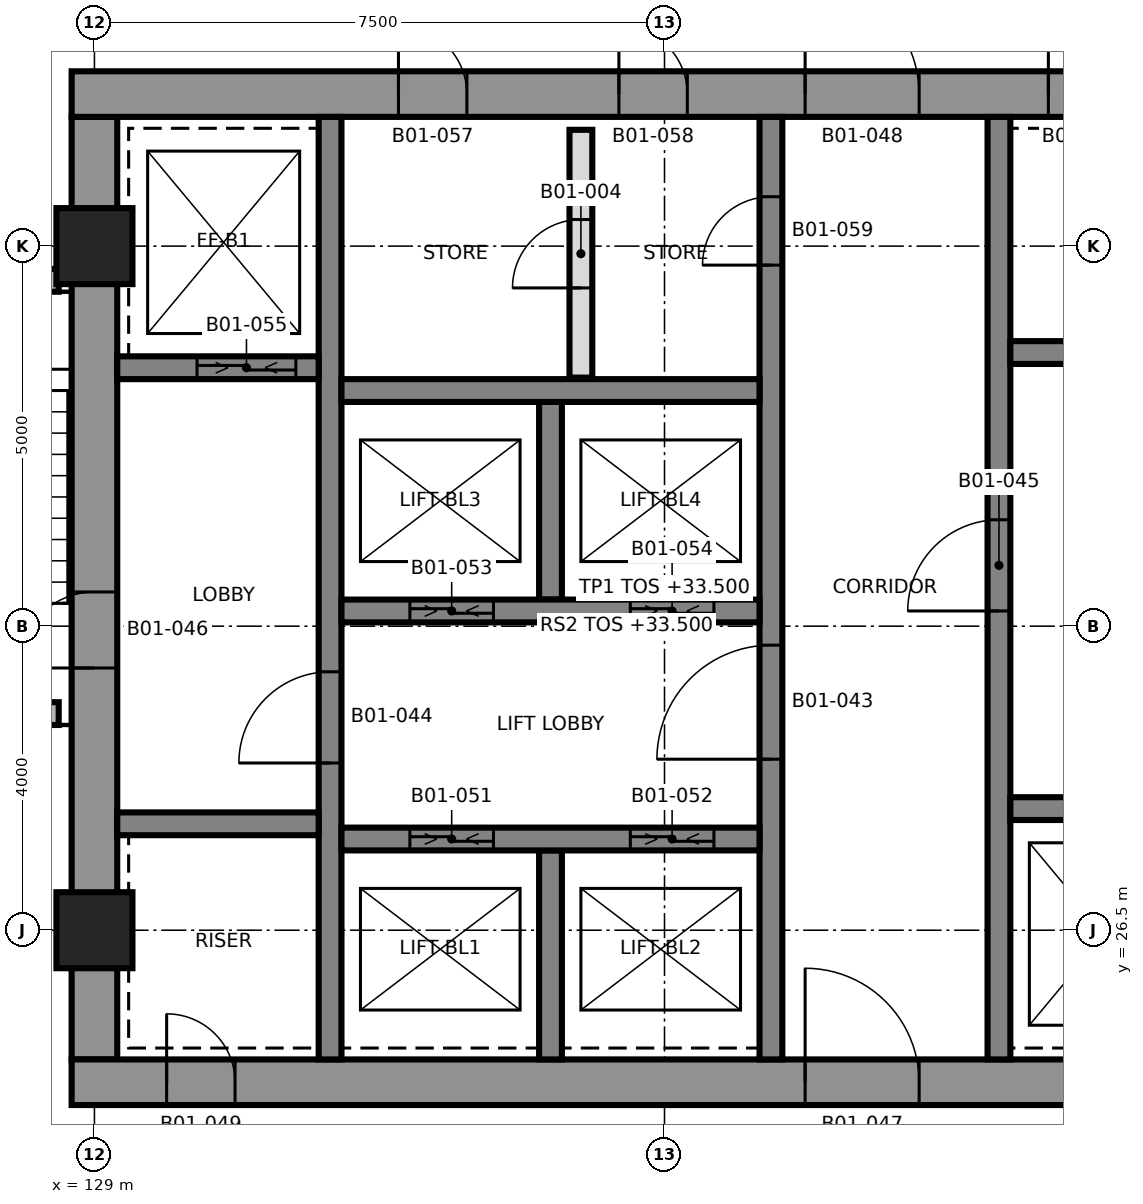
"""IFC4 building model, lengths in metres.
Left out: names, types, materials, properties, quantities, classifications, styles, units other than length and angle.
Written with IfcOpenShell. Run it as: python <this file> out.ifc"""

import sys

from ifc_helpers import new_model, si_unit, direction, frame, frame_2d, origin, origin_2d, place, context, subcontext, project, spatial, rectangle, extrude, element, fill, save


model = new_model("IFC4")
c1 = context("Model", 3, precision=1e-05, world=origin(), true_north=direction((0.0, 1.0)))
c2 = subcontext(c1, "Body", "Model", "MODEL_VIEW")
j1 = project(units=[si_unit("LENGTHUNIT", "METRE"), si_unit("PLANEANGLEUNIT", "RADIAN")], contexts=[c1])
p1 = place(None, origin())
s1 = spatial("IfcSite", under=j1, at=p1, CompositionType="ELEMENT")
p2 = place(p1, origin())
s2 = spatial("IfcBuilding", under=s1, at=p2, CompositionType="ELEMENT")
p3 = place(p2, frame((0.0, 0.0, 33.5)))
s3 = spatial("IfcBuildingStorey", under=s2, at=p3, CompositionType="ELEMENT", Elevation=33.5)
p4 = place(p3, frame((129.0, 24.8, 0.0), z_axis=(0.0, 0.0, 1.0), x_axis=(0.0, 1.0, 0.0)))
e1 = element("IfcWall", 1, at=p4, inside=s3, PredefinedType="SHEAR", context=c2, shape_type="SweptSolid", body=[
    extrude(rectangle(XDim=12.4, YDim=0.6, at=frame_2d((6.2, 0.0))), origin(), (0.0, 0.0, 1.0), 3.7),
])
p5 = place(p4, frame((5.15, 0.0, 0.0)))
e2 = element("IfcOpeningElement", 2, at=p5, cuts=e1, PredefinedType="OPENING", context=c2, shape_type="SweptSolid", body=[
    extrude(rectangle(XDim=1.0, YDim=2.1, at=frame_2d((0.5, 1.05))), frame((0.0, 0.31, 0.0), z_axis=(0.0, -1.0, 0.0), x_axis=(1.0, 0.0, 0.0)), (0.0, 0.0, 1.0), 0.62),
])
p6 = place(p3, frame((128.7, 24.5, 0.0), z_axis=(0.0, 0.0, 1.0), x_axis=(1.0, 0.0, 0.0)))
e3 = element("IfcWall", 3, at=p6, inside=s3, PredefinedType="SHEAR", context=c2, shape_type="SweptSolid", body=[
    extrude(rectangle(XDim=15.0, YDim=0.6, at=frame_2d((7.5, 0.0))), origin(), (0.0, 0.0, 1.0), 3.7),
])
p7 = place(p6, frame((9.65, 0.0, 0.0)))
e4 = element("IfcOpeningElement", 4, at=p7, cuts=e3, PredefinedType="OPENING", context=c2, shape_type="SweptSolid", body=[
    extrude(rectangle(XDim=1.5, YDim=2.1, at=frame_2d((0.75, 1.05))), frame((0.0, 0.31, 0.0), z_axis=(0.0, -1.0, 0.0), x_axis=(1.0, 0.0, 0.0)), (0.0, 0.0, 1.0), 0.62),
])
p8 = place(p6, frame((1.25, 0.0, 0.0)))
e5 = element("IfcOpeningElement", 5, at=p8, cuts=e3, PredefinedType="OPENING", context=c2, shape_type="SweptSolid", body=[
    extrude(rectangle(XDim=0.9, YDim=2.1, at=frame_2d((0.45, 1.05))), frame((0.0, 0.31, 0.0), z_axis=(0.0, -1.0, 0.0), x_axis=(1.0, 0.0, 0.0)), (0.0, 0.0, 1.0), 0.62),
])
p9 = place(p3, frame((128.7, 37.5, 0.0), z_axis=(0.0, 0.0, 1.0), x_axis=(1.0, 0.0, 0.0)))
e6 = element("IfcWall", 6, at=p9, inside=s3, PredefinedType="SHEAR", context=c2, shape_type="SweptSolid", body=[
    extrude(rectangle(XDim=15.0, YDim=0.6, at=frame_2d((7.5, 0.0))), origin(), (0.0, 0.0, 1.0), 3.7),
])
p10 = place(p9, frame((9.65, 0.0, 0.0)))
e7 = element("IfcOpeningElement", 7, at=p10, cuts=e6, PredefinedType="OPENING", context=c2, shape_type="SweptSolid", body=[
    extrude(rectangle(XDim=1.5, YDim=2.1, at=frame_2d((0.75, 1.05))), frame((0.0, 0.31, 0.0), z_axis=(0.0, -1.0, 0.0), x_axis=(1.0, 0.0, 0.0)), (0.0, 0.0, 1.0), 0.62),
])
p11 = place(p9, frame((12.85, 0.0, 0.0)))
e8 = element("IfcOpeningElement", 8, at=p11, cuts=e6, PredefinedType="OPENING", context=c2, shape_type="SweptSolid", body=[
    extrude(rectangle(XDim=0.9, YDim=2.1, at=frame_2d((0.45, 1.05))), frame((0.0, 0.31, 0.0), z_axis=(0.0, -1.0, 0.0), x_axis=(1.0, 0.0, 0.0)), (0.0, 0.0, 1.0), 0.62),
])
p12 = place(p9, frame((4.3, 0.0, 0.0)))
e9 = element("IfcOpeningElement", 9, at=p12, cuts=e6, PredefinedType="OPENING", context=c2, shape_type="SweptSolid", body=[
    extrude(rectangle(XDim=0.9, YDim=2.1, at=frame_2d((0.45, 1.05))), frame((0.0, 0.31, 0.0), z_axis=(0.0, -1.0, 0.0), x_axis=(1.0, 0.0, 0.0)), (0.0, 0.0, 1.0), 0.62),
])
p13 = place(p9, frame((7.2, 0.0, 0.0)))
e10 = element("IfcOpeningElement", 10, at=p13, cuts=e6, PredefinedType="OPENING", context=c2, shape_type="SweptSolid", body=[
    extrude(rectangle(XDim=0.9, YDim=2.1, at=frame_2d((0.45, 1.05))), frame((0.0, 0.31, 0.0), z_axis=(0.0, -1.0, 0.0), x_axis=(1.0, 0.0, 0.0)), (0.0, 0.0, 1.0), 0.62),
])
p14 = place(p3, frame((132.1, 24.8, 0.0), z_axis=(0.0, 0.0, 1.0), x_axis=(0.0, 1.0, 0.0)))
e11 = element("IfcWall", 11, at=p14, inside=s3, PredefinedType="SHEAR", context=c2, shape_type="SweptSolid", body=[
    extrude(rectangle(XDim=12.4, YDim=0.3, at=frame_2d((6.2, 0.0))), origin(), (0.0, 0.0, 1.0), 3.7),
])
p15 = place(p14, frame((3.9, 0.0, 0.0)))
e12 = element("IfcOpeningElement", 12, at=p15, cuts=e11, PredefinedType="OPENING", context=c2, shape_type="SweptSolid", body=[
    extrude(rectangle(XDim=1.2, YDim=2.1, at=frame_2d((0.6, 1.05))), frame((0.0, 0.16, 0.0), z_axis=(0.0, -1.0, 0.0), x_axis=(1.0, 0.0, 0.0)), (0.0, 0.0, 1.0), 0.32),
])
p16 = place(p3, frame((137.9, 24.8, 0.0), z_axis=(0.0, 0.0, 1.0), x_axis=(0.0, 1.0, 0.0)))
e13 = element("IfcWall", 13, at=p16, inside=s3, PredefinedType="SHEAR", context=c2, shape_type="SweptSolid", body=[
    extrude(rectangle(XDim=12.4, YDim=0.3, at=frame_2d((6.2, 0.0))), origin(), (0.0, 0.0, 1.0), 3.7),
])
p17 = place(p16, frame((3.95, 0.0, 0.0)))
e14 = element("IfcOpeningElement", 14, at=p17, cuts=e13, PredefinedType="OPENING", context=c2, shape_type="SweptSolid", body=[
    extrude(rectangle(XDim=1.5, YDim=2.1, at=frame_2d((0.75, 1.05))), frame((0.0, 0.16, 0.0), z_axis=(0.0, -1.0, 0.0), x_axis=(1.0, 0.0, 0.0)), (0.0, 0.0, 1.0), 0.32),
])
p18 = place(p16, frame((10.45, 0.0, 0.0)))
e15 = element("IfcOpeningElement", 15, at=p18, cuts=e13, PredefinedType="OPENING", context=c2, shape_type="SweptSolid", body=[
    extrude(rectangle(XDim=0.9, YDim=2.1, at=frame_2d((0.45, 1.05))), frame((0.0, 0.16, 0.0), z_axis=(0.0, -1.0, 0.0), x_axis=(1.0, 0.0, 0.0)), (0.0, 0.0, 1.0), 0.32),
])
p19 = place(p3, frame((140.9, 24.8, 0.0), z_axis=(0.0, 0.0, 1.0), x_axis=(0.0, 1.0, 0.0)))
e16 = element("IfcWall", 16, at=p19, inside=s3, PredefinedType="SHEAR", context=c2, shape_type="SweptSolid", body=[
    extrude(rectangle(XDim=12.4, YDim=0.3, at=frame_2d((6.2, 0.0))), origin(), (0.0, 0.0, 1.0), 3.7),
])
p20 = place(p19, frame((5.9, 0.0, 0.0)))
e17 = element("IfcOpeningElement", 17, at=p20, cuts=e16, PredefinedType="OPENING", context=c2, shape_type="SweptSolid", body=[
    extrude(rectangle(XDim=1.2, YDim=2.1, at=frame_2d((0.6, 1.05))), frame((0.0, 0.16, 0.0), z_axis=(0.0, -1.0, 0.0), x_axis=(1.0, 0.0, 0.0)), (0.0, 0.0, 1.0), 0.32),
])
p21 = place(p3, frame((135.0, 24.8, 0.0), z_axis=(0.0, 0.0, 1.0), x_axis=(0.0, 1.0, 0.0)))
e18 = element("IfcWall", 18, at=p21, inside=s3, PredefinedType="SHEAR", context=c2, shape_type="SweptSolid", body=[
    extrude(rectangle(XDim=2.75, YDim=0.3, at=frame_2d((1.375, 0.0))), origin(), (0.0, 0.0, 1.0), 3.7),
])
p22 = place(p3, frame((135.0, 30.85, 0.0), z_axis=(0.0, 0.0, 1.0), x_axis=(0.0, 1.0, 0.0)))
e19 = element("IfcWall", 19, at=p22, inside=s3, PredefinedType="SHEAR", context=c2, shape_type="SweptSolid", body=[
    extrude(rectangle(XDim=2.6, YDim=0.3, at=frame_2d((1.3, 0.0))), origin(), (0.0, 0.0, 1.0), 3.7),
])
p23 = place(p3, frame((132.25, 27.7, 0.0), z_axis=(0.0, 0.0, 1.0), x_axis=(1.0, 0.0, 0.0)))
e20 = element("IfcWall", 20, at=p23, inside=s3, PredefinedType="SHEAR", context=c2, shape_type="SweptSolid", body=[
    extrude(rectangle(XDim=5.5, YDim=0.3, at=frame_2d((2.75, 0.0))), origin(), (0.0, 0.0, 1.0), 3.7),
])
p24 = place(p23, frame((0.9, 0.0, 0.0)))
e21 = element("IfcOpeningElement", 21, at=p24, cuts=e20, PredefinedType="OPENING", context=c2, shape_type="SweptSolid", body=[
    extrude(rectangle(XDim=1.1, YDim=2.4, at=frame_2d((0.55, 1.2))), frame((0.0, 0.16, 0.0), z_axis=(0.0, -1.0, 0.0), x_axis=(1.0, 0.0, 0.0)), (0.0, 0.0, 1.0), 0.32),
])
p25 = place(p23, frame((3.8, 0.0, 0.0)))
e22 = element("IfcOpeningElement", 22, at=p25, cuts=e20, PredefinedType="OPENING", context=c2, shape_type="SweptSolid", body=[
    extrude(rectangle(XDim=1.1, YDim=2.4, at=frame_2d((0.55, 1.2))), frame((0.0, 0.16, 0.0), z_axis=(0.0, -1.0, 0.0), x_axis=(1.0, 0.0, 0.0)), (0.0, 0.0, 1.0), 0.32),
])
p26 = place(p3, frame((132.25, 30.7, 0.0), z_axis=(0.0, 0.0, 1.0), x_axis=(1.0, 0.0, 0.0)))
e23 = element("IfcWall", 23, at=p26, inside=s3, PredefinedType="SHEAR", context=c2, shape_type="SweptSolid", body=[
    extrude(rectangle(XDim=5.5, YDim=0.3, at=frame_2d((2.75, 0.0))), origin(), (0.0, 0.0, 1.0), 3.7),
])
p27 = place(p26, frame((0.9, 0.0, 0.0)))
e24 = element("IfcOpeningElement", 24, at=p27, cuts=e23, PredefinedType="OPENING", context=c2, shape_type="SweptSolid", body=[
    extrude(rectangle(XDim=1.1, YDim=2.4, at=frame_2d((0.55, 1.2))), frame((0.0, 0.16, 0.0), z_axis=(0.0, -1.0, 0.0), x_axis=(1.0, 0.0, 0.0)), (0.0, 0.0, 1.0), 0.32),
])
p28 = place(p26, frame((3.8, 0.0, 0.0)))
e25 = element("IfcOpeningElement", 25, at=p28, cuts=e23, PredefinedType="OPENING", context=c2, shape_type="SweptSolid", body=[
    extrude(rectangle(XDim=1.1, YDim=2.4, at=frame_2d((0.55, 1.2))), frame((0.0, 0.16, 0.0), z_axis=(0.0, -1.0, 0.0), x_axis=(1.0, 0.0, 0.0)), (0.0, 0.0, 1.0), 0.32),
])
p29 = place(p3, frame((132.25, 33.6, 0.0), z_axis=(0.0, 0.0, 1.0), x_axis=(1.0, 0.0, 0.0)))
e26 = element("IfcWall", 26, at=p29, inside=s3, PredefinedType="SHEAR", context=c2, shape_type="SweptSolid", body=[
    extrude(rectangle(XDim=5.5, YDim=0.3, at=frame_2d((2.75, 0.0))), origin(), (0.0, 0.0, 1.0), 3.7),
])
p30 = place(p3, frame((129.3, 27.9, 0.0), z_axis=(0.0, 0.0, 1.0), x_axis=(1.0, 0.0, 0.0)))
e27 = element("IfcWall", 27, at=p30, inside=s3, PredefinedType="SHEAR", context=c2, shape_type="SweptSolid", body=[
    extrude(rectangle(XDim=2.65, YDim=0.3, at=frame_2d((1.325, 0.0))), origin(), (0.0, 0.0, 1.0), 3.7),
])
p31 = place(p3, frame((129.3, 33.9, 0.0), z_axis=(0.0, 0.0, 1.0), x_axis=(1.0, 0.0, 0.0)))
e28 = element("IfcWall", 28, at=p31, inside=s3, PredefinedType="SHEAR", context=c2, shape_type="SweptSolid", body=[
    extrude(rectangle(XDim=2.65, YDim=0.3, at=frame_2d((1.325, 0.0))), origin(), (0.0, 0.0, 1.0), 3.7),
])
p32 = place(p31, frame((1.05, 0.0, 0.0)))
e29 = element("IfcOpeningElement", 29, at=p32, cuts=e28, PredefinedType="OPENING", context=c2, shape_type="SweptSolid", body=[
    extrude(rectangle(XDim=1.3, YDim=2.4, at=frame_2d((0.65, 1.2))), frame((0.0, 0.16, 0.0), z_axis=(0.0, -1.0, 0.0), x_axis=(1.0, 0.0, 0.0)), (0.0, 0.0, 1.0), 0.32),
])
p33 = place(p3, frame((141.05, 28.1, 0.0), z_axis=(0.0, 0.0, 1.0), x_axis=(1.0, 0.0, 0.0)))
e30 = element("IfcWall", 30, at=p33, inside=s3, PredefinedType="SHEAR", context=c2, shape_type="SweptSolid", body=[
    extrude(rectangle(XDim=2.65, YDim=0.3, at=frame_2d((1.325, 0.0))), origin(), (0.0, 0.0, 1.0), 3.7),
])
p34 = place(p33, frame((0.75, 0.0, 0.0)))
e31 = element("IfcOpeningElement", 31, at=p34, cuts=e30, PredefinedType="OPENING", context=c2, shape_type="SweptSolid", body=[
    extrude(rectangle(XDim=1.3, YDim=2.4, at=frame_2d((0.65, 1.2))), frame((0.0, 0.16, 0.0), z_axis=(0.0, -1.0, 0.0), x_axis=(1.0, 0.0, 0.0)), (0.0, 0.0, 1.0), 0.32),
])
p35 = place(p3, frame((141.05, 34.1, 0.0), z_axis=(0.0, 0.0, 1.0), x_axis=(1.0, 0.0, 0.0)))
e32 = element("IfcWall", 32, at=p35, inside=s3, PredefinedType="SHEAR", context=c2, shape_type="SweptSolid", body=[
    extrude(rectangle(XDim=2.65, YDim=0.3, at=frame_2d((1.325, 0.0))), origin(), (0.0, 0.0, 1.0), 3.7),
])
for number, where, z_axis, x_axis in (
    (33, (129.0, 26.5, 0.0), (0.0, 0.0, 1.0), (1.0, 0.0, 0.0)),
    (34, (129.0, 35.5, 0.0), (0.0, 0.0, 1.0), (1.0, 0.0, 0.0)),
):
    element("IfcColumn", number, at=place(p3, frame(where, z_axis=z_axis, x_axis=x_axis)), inside=s3, PredefinedType="COLUMN", context=c2, shape_type="SweptSolid", body=[
        extrude(rectangle(XDim=1.0, YDim=1.0, at=origin_2d()), origin(), (0.0, 0.0, 1.0), 3.7),
    ])
p36 = place(p3, frame((125.7, 29.35, 0.0), z_axis=(0.0, 0.0, 1.0), x_axis=(1.0, 0.0, 0.0)))
e35 = element("IfcWall", 35, at=p36, inside=s3, PredefinedType="SHEAR", context=c2, shape_type="SweptSolid", body=[
    extrude(rectangle(XDim=2.83, YDim=0.3, at=frame_2d((1.415, 0.0))), origin(), (0.0, 0.0, 1.0), 3.4),
])
p37 = place(p36, frame((0.975, 0.0, 0.0)))
e36 = element("IfcOpeningElement", 36, at=p37, cuts=e35, PredefinedType="OPENING", context=c2, shape_type="SweptSolid", body=[
    extrude(rectangle(XDim=1.2, YDim=2.1, at=frame_2d((0.6, 1.05))), frame((0.0, 0.16, 0.0), z_axis=(0.0, -1.0, 0.0), x_axis=(1.0, 0.0, 0.0)), (0.0, 0.0, 1.0), 0.32),
])
p38 = place(p3, frame((125.7, 35.05, 0.0), z_axis=(0.0, 0.0, 1.0), x_axis=(1.0, 0.0, 0.0)))
e37 = element("IfcWall", 37, at=p38, inside=s3, PredefinedType="SHEAR", context=c2, shape_type="SweptSolid", body=[
    extrude(rectangle(XDim=2.83, YDim=0.3, at=frame_2d((1.415, 0.0))), origin(), (0.0, 0.0, 1.0), 3.4),
])
p39 = place(p3, frame((135.4, 33.77, 0.0), z_axis=(0.0, 0.0, 1.0), x_axis=(0.0, 1.0, 0.0)))
e38 = element("IfcWall", 38, at=p39, inside=s3, PredefinedType="PARTITIONING", context=c2, shape_type="SweptSolid", body=[
    extrude(rectangle(XDim=3.26, YDim=0.3, at=frame_2d((1.63, 0.0))), origin(), (0.0, 0.0, 1.0), 3.4),
])
p40 = place(p39, frame((1.18, 0.0, 0.0)))
e39 = element("IfcOpeningElement", 39, at=p40, cuts=e38, PredefinedType="OPENING", context=c2, shape_type="SweptSolid", body=[
    extrude(rectangle(XDim=0.9, YDim=2.1, at=frame_2d((0.45, 1.05))), frame((0.0, 0.16, 0.0), z_axis=(0.0, -1.0, 0.0), x_axis=(1.0, 0.0, 0.0)), (0.0, 0.0, 1.0), 0.32),
])
p41 = place(p40, origin())
e40 = element("IfcDoor", 40, at=p41, inside=s3, OperationType="SINGLE_SWING_RIGHT", PredefinedType="DOOR", context=c2, shape_type="SweptSolid", body=[
    extrude(rectangle(XDim=0.9, YDim=2.1, at=frame_2d((0.45, 1.05))), frame((0.0, 0.025, 0.0), z_axis=(0.0, -1.0, 0.0), x_axis=(1.0, 0.0, 0.0)), (0.0, 0.0, 1.0), 0.05),
])
fill(e39, e40)
p42 = place(p17, origin())
e41 = element("IfcDoor", 41, at=p42, inside=s3, OperationType="SINGLE_SWING_RIGHT", PredefinedType="DOOR", context=c2, shape_type="SweptSolid", body=[
    extrude(rectangle(XDim=1.5, YDim=2.1, at=frame_2d((0.75, 1.05))), frame((0.0, 0.025, 0.0), z_axis=(0.0, -1.0, 0.0), x_axis=(1.0, 0.0, 0.0)), (0.0, 0.0, 1.0), 0.05),
])
fill(e14, e41)
p43 = place(p15, origin())
e42 = element("IfcDoor", 42, at=p43, inside=s3, OperationType="SINGLE_SWING_LEFT", PredefinedType="DOOR", context=c2, shape_type="SweptSolid", body=[
    extrude(rectangle(XDim=1.2, YDim=2.1, at=frame_2d((0.6, 1.05))), frame((0.0, 0.025, 0.0), z_axis=(0.0, -1.0, 0.0), x_axis=(1.0, 0.0, 0.0)), (0.0, 0.0, 1.0), 0.05),
])
fill(e12, e42)
p44 = place(p20, origin())
e43 = element("IfcDoor", 43, at=p44, inside=s3, OperationType="SINGLE_SWING_RIGHT", PredefinedType="DOOR", context=c2, shape_type="SweptSolid", body=[
    extrude(rectangle(XDim=1.2, YDim=2.1, at=frame_2d((0.6, 1.05))), frame((0.0, 0.025, 0.0), z_axis=(0.0, -1.0, 0.0), x_axis=(1.0, 0.0, 0.0)), (0.0, 0.0, 1.0), 0.05),
])
fill(e17, e43)
p45 = place(p5, origin())
e44 = element("IfcDoor", 44, at=p45, inside=s3, OperationType="SINGLE_SWING_RIGHT", PredefinedType="DOOR", context=c2, shape_type="SweptSolid", body=[
    extrude(rectangle(XDim=1.0, YDim=2.1, at=frame_2d((0.5, 1.05))), frame((0.0, 0.025, 0.0), z_axis=(0.0, -1.0, 0.0), x_axis=(1.0, 0.0, 0.0)), (0.0, 0.0, 1.0), 0.05),
])
fill(e2, e44)
p46 = place(p7, origin())
e45 = element("IfcDoor", 45, at=p46, inside=s3, OperationType="SINGLE_SWING_LEFT", PredefinedType="DOOR", context=c2, shape_type="SweptSolid", body=[
    extrude(rectangle(XDim=1.5, YDim=2.1, at=frame_2d((0.75, 1.05))), frame((0.0, 0.025, 0.0), z_axis=(0.0, -1.0, 0.0), x_axis=(1.0, 0.0, 0.0)), (0.0, 0.0, 1.0), 0.05),
])
fill(e4, e45)
p47 = place(p10, origin())
e46 = element("IfcDoor", 46, at=p47, inside=s3, OperationType="SINGLE_SWING_RIGHT", PredefinedType="DOOR", context=c2, shape_type="SweptSolid", body=[
    extrude(rectangle(XDim=1.5, YDim=2.1, at=frame_2d((0.75, 1.05))), frame((0.0, 0.025, 0.0), z_axis=(0.0, -1.0, 0.0), x_axis=(1.0, 0.0, 0.0)), (0.0, 0.0, 1.0), 0.05),
])
fill(e7, e46)
p48 = place(p8, origin())
e47 = element("IfcDoor", 47, at=p48, inside=s3, OperationType="SINGLE_SWING_LEFT", PredefinedType="DOOR", context=c2, shape_type="SweptSolid", body=[
    extrude(rectangle(XDim=0.9, YDim=2.1, at=frame_2d((0.45, 1.05))), frame((0.0, 0.025, 0.0), z_axis=(0.0, -1.0, 0.0), x_axis=(1.0, 0.0, 0.0)), (0.0, 0.0, 1.0), 0.05),
])
fill(e5, e47)
p49 = place(p11, origin())
e48 = element("IfcDoor", 48, at=p49, inside=s3, OperationType="SINGLE_SWING_RIGHT", PredefinedType="DOOR", context=c2, shape_type="SweptSolid", body=[
    extrude(rectangle(XDim=0.9, YDim=2.1, at=frame_2d((0.45, 1.05))), frame((0.0, 0.025, 0.0), z_axis=(0.0, -1.0, 0.0), x_axis=(1.0, 0.0, 0.0)), (0.0, 0.0, 1.0), 0.05),
])
fill(e8, e48)
p50 = place(p24, origin())
e49 = element("IfcDoor", 49, at=p50, inside=s3, OperationType="SLIDING_TO_LEFT", PredefinedType="DOOR", context=c2, shape_type="SweptSolid", body=[
    extrude(rectangle(XDim=1.1, YDim=2.4, at=frame_2d((0.55, 1.2))), frame((0.0, 0.025, 0.0), z_axis=(0.0, -1.0, 0.0), x_axis=(1.0, 0.0, 0.0)), (0.0, 0.0, 1.0), 0.05),
])
fill(e21, e49)
p51 = place(p25, origin())
e50 = element("IfcDoor", 50, at=p51, inside=s3, OperationType="SLIDING_TO_LEFT", PredefinedType="DOOR", context=c2, shape_type="SweptSolid", body=[
    extrude(rectangle(XDim=1.1, YDim=2.4, at=frame_2d((0.55, 1.2))), frame((0.0, 0.025, 0.0), z_axis=(0.0, -1.0, 0.0), x_axis=(1.0, 0.0, 0.0)), (0.0, 0.0, 1.0), 0.05),
])
fill(e22, e50)
p52 = place(p27, origin())
e51 = element("IfcDoor", 51, at=p52, inside=s3, OperationType="SLIDING_TO_LEFT", PredefinedType="DOOR", context=c2, shape_type="SweptSolid", body=[
    extrude(rectangle(XDim=1.1, YDim=2.4, at=frame_2d((0.55, 1.2))), frame((0.0, 0.025, 0.0), z_axis=(0.0, -1.0, 0.0), x_axis=(1.0, 0.0, 0.0)), (0.0, 0.0, 1.0), 0.05),
])
fill(e24, e51)
p53 = place(p28, origin())
e52 = element("IfcDoor", 52, at=p53, inside=s3, OperationType="SLIDING_TO_LEFT", PredefinedType="DOOR", context=c2, shape_type="SweptSolid", body=[
    extrude(rectangle(XDim=1.1, YDim=2.4, at=frame_2d((0.55, 1.2))), frame((0.0, 0.025, 0.0), z_axis=(0.0, -1.0, 0.0), x_axis=(1.0, 0.0, 0.0)), (0.0, 0.0, 1.0), 0.05),
])
fill(e25, e52)
p54 = place(p32, origin())
e53 = element("IfcDoor", 53, at=p54, inside=s3, OperationType="SLIDING_TO_LEFT", PredefinedType="DOOR", context=c2, shape_type="SweptSolid", body=[
    extrude(rectangle(XDim=1.3, YDim=2.4, at=frame_2d((0.65, 1.2))), frame((0.0, 0.025, 0.0), z_axis=(0.0, -1.0, 0.0), x_axis=(1.0, 0.0, 0.0)), (0.0, 0.0, 1.0), 0.05),
])
fill(e29, e53)
p55 = place(p12, origin())
e54 = element("IfcDoor", 54, at=p55, inside=s3, OperationType="SINGLE_SWING_LEFT", PredefinedType="DOOR", context=c2, shape_type="SweptSolid", body=[
    extrude(rectangle(XDim=0.9, YDim=2.1, at=frame_2d((0.45, 1.05))), frame((0.0, 0.025, 0.0), z_axis=(0.0, -1.0, 0.0), x_axis=(1.0, 0.0, 0.0)), (0.0, 0.0, 1.0), 0.05),
])
fill(e9, e54)
p56 = place(p13, origin())
e55 = element("IfcDoor", 55, at=p56, inside=s3, OperationType="SINGLE_SWING_RIGHT", PredefinedType="DOOR", context=c2, shape_type="SweptSolid", body=[
    extrude(rectangle(XDim=0.9, YDim=2.1, at=frame_2d((0.45, 1.05))), frame((0.0, 0.025, 0.0), z_axis=(0.0, -1.0, 0.0), x_axis=(1.0, 0.0, 0.0)), (0.0, 0.0, 1.0), 0.05),
])
fill(e10, e55)
p57 = place(p18, origin())
e56 = element("IfcDoor", 56, at=p57, inside=s3, OperationType="SINGLE_SWING_RIGHT", PredefinedType="DOOR", context=c2, shape_type="SweptSolid", body=[
    extrude(rectangle(XDim=0.9, YDim=2.1, at=frame_2d((0.45, 1.05))), frame((0.0, 0.025, 0.0), z_axis=(0.0, -1.0, 0.0), x_axis=(1.0, 0.0, 0.0)), (0.0, 0.0, 1.0), 0.05),
])
fill(e15, e56)
save(model, sys.argv[1])
